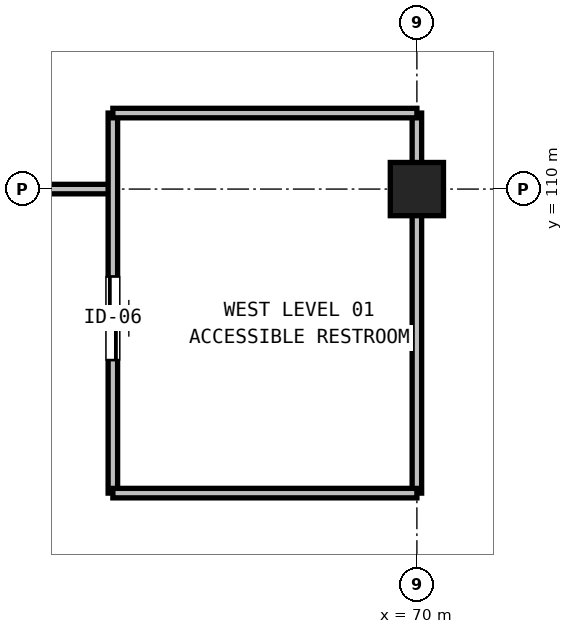
"""IFC4 building model, lengths in metres.
Left out: names, types, materials, properties, quantities, classifications, styles, units other than length and angle.
Written with IfcOpenShell. Run it as: python <this file> out.ifc"""

import sys

from ifc_helpers import new_model, si_unit, direction, frame, frame_2d, origin, origin_2d, place, context, subcontext, project, spatial, rectangle, extrude, element, fill, save


model = new_model("IFC4")
c1 = context("Model", 3, precision=1e-05, world=origin(), true_north=direction((0.0, 1.0)))
c2 = subcontext(c1, "Body", "Model", "MODEL_VIEW")
j1 = project(units=[si_unit("LENGTHUNIT", "METRE"), si_unit("PLANEANGLEUNIT", "RADIAN")], contexts=[c1])
p1 = place(None, origin())
s1 = spatial("IfcSite", under=j1, at=p1, CompositionType="ELEMENT")
p2 = place(p1, origin())
s2 = spatial("IfcBuilding", under=s1, at=p2, CompositionType="ELEMENT")
p3 = place(p2, frame((0.0, 0.0, 5.4)))
s3 = spatial("IfcBuildingStorey", under=s2, at=p3, CompositionType="ELEMENT", Elevation=5.4)
p4 = place(p3, frame((70.0, 110.0, 0.0), z_axis=(0.0, 0.0, 1.0), x_axis=(1.0, 0.0, 0.0)))
e1 = element("IfcColumn", 1, at=p4, inside=s3, PredefinedType="COLUMN", context=c2, shape_type="SweptSolid", body=[
    extrude(rectangle(XDim=0.7, YDim=0.7, at=origin_2d()), origin(), (0.0, 0.0, 1.0), 5.4),
])
p5 = place(p3, frame((54.35, 110.0, 0.0), z_axis=(0.0, 0.0, 1.0), x_axis=(1.0, 0.0, 0.0)))
e2 = element("IfcWall", 2, at=p5, inside=s3, PredefinedType="PARTITIONING", context=c2, shape_type="SweptSolid", body=[
    extrude(rectangle(XDim=11.65, YDim=0.125, at=frame_2d((5.825, 0.0))), origin(), (0.0, 0.0, 1.0), 4.49),
])
p6 = place(p3, frame((66.0, 106.0, 0.0), z_axis=(0.0, 0.0, 1.0), x_axis=(0.0, 1.0, 0.0)))
e3 = element("IfcWall", 3, at=p6, inside=s3, PredefinedType="PARTITIONING", context=c2, shape_type="SweptSolid", body=[
    extrude(rectangle(XDim=5.0, YDim=0.125, at=frame_2d((2.5, 0.0))), origin(), (0.0, 0.0, 1.0), 5.1),
])
p7 = place(p6, frame((1.75, 0.0, 0.0)))
e4 = element("IfcOpeningElement", 4, at=p7, cuts=e3, PredefinedType="OPENING", context=c2, shape_type="SweptSolid", body=[
    extrude(rectangle(XDim=1.1, YDim=2.15, at=frame_2d((0.55, 1.075))), frame((0.0, 0.073, 0.0), z_axis=(0.0, -1.0, 0.0), x_axis=(1.0, 0.0, 0.0)), (0.0, 0.0, 1.0), 0.145),
])
p8 = place(p3, frame((70.0, 106.0, 0.0), z_axis=(0.0, 0.0, 1.0), x_axis=(0.0, 1.0, 0.0)))
e5 = element("IfcWall", 5, at=p8, inside=s3, PredefinedType="PARTITIONING", context=c2, shape_type="SweptSolid", body=[
    extrude(rectangle(XDim=5.0, YDim=0.125, at=frame_2d((2.5, 0.0))), origin(), (0.0, 0.0, 1.0), 4.24),
])
for number, where, z_axis, x_axis in (
    (6, (66.0, 111.0, 0.0), (0.0, 0.0, 1.0), (1.0, 0.0, 0.0)),
    (7, (66.0, 106.0, 0.0), (0.0, 0.0, 1.0), (1.0, 0.0, 0.0)),
):
    element("IfcWall", number, at=place(p3, frame(where, z_axis=z_axis, x_axis=x_axis)), inside=s3, PredefinedType="PARTITIONING", context=c2, shape_type="SweptSolid", body=[
        extrude(rectangle(XDim=4.0, YDim=0.125, at=frame_2d((2.0, 0.0))), origin(), (0.0, 0.0, 1.0), 5.1),
    ])
p9 = place(p7, frame((1.1, 0.0, 0.0), z_axis=(0.0, 0.0, 1.0), x_axis=(-1.0, 0.0, 0.0)))
e8 = element("IfcDoor", 8, at=p9, inside=s3, OperationType="SLIDING_TO_RIGHT", PredefinedType="DOOR", context=c2, shape_type="SweptSolid", body=[
    extrude(rectangle(XDim=1.1, YDim=2.15, at=frame_2d((0.55, 1.075))), frame((0.0, 0.025, 0.0), z_axis=(0.0, -1.0, 0.0), x_axis=(1.0, 0.0, 0.0)), (0.0, 0.0, 1.0), 0.05),
])
fill(e4, e8)
save(model, sys.argv[1])
